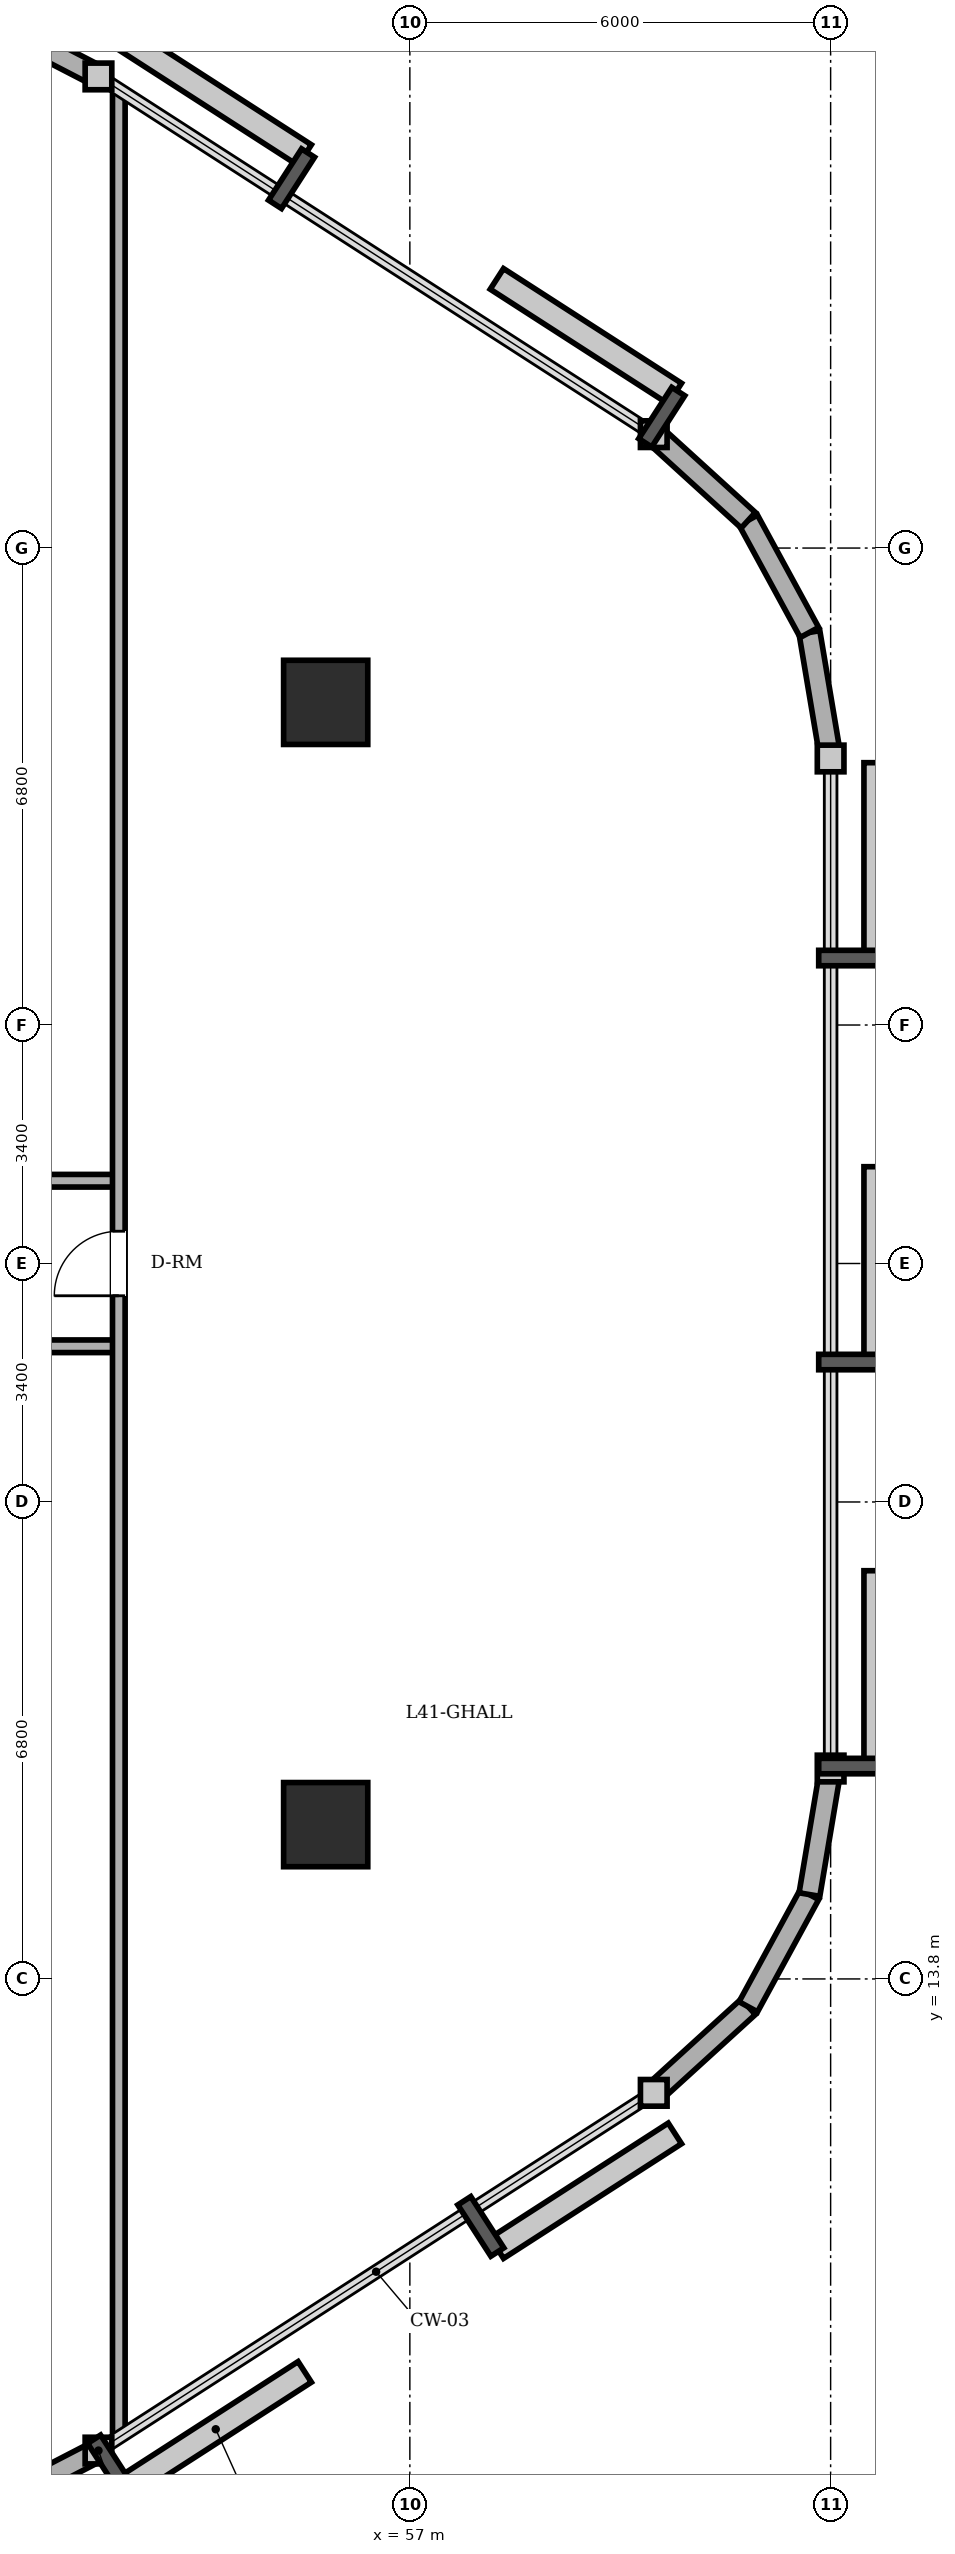
"""IFC4 building model, lengths in metres.
Left out: names, types, materials, properties, quantities, classifications, styles, units other than length and angle.
Written with IfcOpenShell. Run it as: python <this file> out.ifc"""

import sys

from ifc_helpers import new_model, si_unit, direction, frame, frame_2d, origin, origin_2d, place, context, subcontext, project, spatial, rectangle, circle, extrude, element, fill, save


model = new_model("IFC4")
c1 = context("Model", 3, precision=1e-05, world=origin(), true_north=direction((0.0, 1.0)))
c2 = subcontext(c1, "Body", "Model", "MODEL_VIEW")
j1 = project(units=[si_unit("LENGTHUNIT", "METRE"), si_unit("PLANEANGLEUNIT", "RADIAN")], contexts=[c1])
p1 = place(None, origin())
s1 = spatial("IfcSite", under=j1, at=p1, CompositionType="ELEMENT")
p2 = place(p1, origin())
s2 = spatial("IfcBuilding", under=s1, at=p2, CompositionType="ELEMENT")
p3 = place(p2, frame((0.0, 0.0, 158.2)))
s3 = spatial("IfcBuildingStorey", under=s2, at=p3, CompositionType="ELEMENT", Elevation=158.2)
for number, where, z_axis, x_axis in (
    (1, (55.8, 16.0, 0.0), (0.0, 0.0, 1.0), (1.0, 0.0, 0.0)),
    (2, (55.8, 32.0, 0.0), (0.0, 0.0, 1.0), (1.0, 0.0, 0.0)),
):
    element("IfcColumn", number, at=place(p3, frame(where, z_axis=z_axis, x_axis=x_axis)), inside=s3, PredefinedType="COLUMN", context=c2, shape_type="SweptSolid", body=[
        extrude(circle(Radius=0.6, at=origin_2d()), origin(), (0.0, 0.0, 1.0), 3.6),
    ])
p4 = place(p3, frame((51.63, 6.595, 0.0), z_axis=(0.0, 0.0, 1.0), x_axis=(0.888283247196, 0.459296062198, 0.0)))
e3 = element("IfcWall", 3, at=p4, inside=s3, PredefinedType="SOLIDWALL", context=c2, shape_type="SweptSolid", body=[
    extrude(rectangle(XDim=1.047, YDim=0.3, at=frame_2d((0.523, 0.0))), origin(), (0.0, 0.0, 1.0), 3.4),
])
p5 = place(p3, frame((60.478, 12.176, 0.0), z_axis=(0.0, 0.0, 1.0), x_axis=(0.73947929393, 0.673179302897, 0.0)))
e4 = element("IfcWall", 4, at=p5, inside=s3, PredefinedType="SOLIDWALL", context=c2, shape_type="SweptSolid", body=[
    extrude(rectangle(XDim=1.823, YDim=0.3, at=frame_2d((0.911, 0.0))), origin(), (0.0, 0.0, 1.0), 3.4),
])
p6 = place(p3, frame((61.826, 13.403, 0.0), z_axis=(0.0, 0.0, 1.0), x_axis=(0.478608030646, 0.878028674362, 0.0)))
e5 = element("IfcWall", 5, at=p6, inside=s3, PredefinedType="SOLIDWALL", context=c2, shape_type="SweptSolid", body=[
    extrude(rectangle(XDim=1.822, YDim=0.3, at=frame_2d((0.911, 0.0))), origin(), (0.0, 0.0, 1.0), 3.4),
])
for number, where, z_axis, x_axis in (
    (6, (62.698, 15.003, 0.0), (0.0, 0.0, 1.0), (0.166, 0.986, 0.0)),
    (7, (63.0, 31.2, 0.0), (0.0, 0.0, 1.0), (-0.166, 0.986, 0.0)),
):
    element("IfcWall", number, at=place(p3, frame(where, z_axis=z_axis, x_axis=x_axis)), inside=s3, PredefinedType="SOLIDWALL", context=c2, shape_type="SweptSolid", body=[
        extrude(rectangle(XDim=1.822, YDim=0.3, at=frame_2d((0.911, 0.0))), origin(), (0.0, 0.0, 1.0), 3.4),
    ])
p7 = place(p3, frame((62.698, 32.997, 0.0), z_axis=(0.0, 0.0, 1.0), x_axis=(-0.478608030646, 0.878028674362, 0.0)))
e8 = element("IfcWall", 8, at=p7, inside=s3, PredefinedType="SOLIDWALL", context=c2, shape_type="SweptSolid", body=[
    extrude(rectangle(XDim=1.822, YDim=0.3, at=frame_2d((0.911, 0.0))), origin(), (0.0, 0.0, 1.0), 3.4),
])
p8 = place(p3, frame((61.826, 34.597, 0.0), z_axis=(0.0, 0.0, 1.0), x_axis=(-0.73947929393, 0.673179302897, 0.0)))
e9 = element("IfcWall", 9, at=p8, inside=s3, PredefinedType="SOLIDWALL", context=c2, shape_type="SweptSolid", body=[
    extrude(rectangle(XDim=1.823, YDim=0.3, at=frame_2d((0.911, 0.0))), origin(), (0.0, 0.0, 1.0), 3.4),
])
p9 = place(p3, frame((52.56, 40.924, 0.0), z_axis=(0.0, 0.0, 1.0), x_axis=(-0.888283247196, 0.459296062198, 0.0)))
e10 = element("IfcWall", 10, at=p9, inside=s3, PredefinedType="SOLIDWALL", context=c2, shape_type="SweptSolid", body=[
    extrude(rectangle(XDim=1.047, YDim=0.3, at=frame_2d((0.523, 0.0))), origin(), (0.0, 0.0, 1.0), 3.4),
])
for number, where, z_axis, x_axis in (
    (11, (41.75, 22.82, 0.0), (0.0, 0.0, 1.0), (1.0, 0.0, 0.0)),
    (12, (41.75, 25.18, 0.0), (0.0, 0.0, 1.0), (1.0, 0.0, 0.0)),
):
    element("IfcWall", number, at=place(p3, frame(where, z_axis=z_axis, x_axis=x_axis)), inside=s3, PredefinedType="PARTITIONING", context=c2, shape_type="SweptSolid", body=[
        extrude(rectangle(XDim=11.1, YDim=0.18, at=frame_2d((5.55, 0.0))), origin(), (0.0, 0.0, 1.0), 3.4),
    ])
p10 = place(p3, frame((52.85, 7.263, 0.0), z_axis=(0.0, 0.0, 1.0), x_axis=(0.0, 1.0, 0.0)))
e13 = element("IfcWall", 13, at=p10, inside=s3, PredefinedType="PARTITIONING", context=c2, shape_type="SweptSolid", body=[
    extrude(rectangle(XDim=33.474, YDim=0.18, at=frame_2d((16.737, 0.0))), origin(), (0.0, 0.0, 1.0), 3.4),
])
p11 = place(p10, frame((16.277, 0.0, 0.0)))
e14 = element("IfcOpeningElement", 14, at=p11, cuts=e13, PredefinedType="OPENING", context=c2, shape_type="SweptSolid", body=[
    extrude(rectangle(XDim=0.92, YDim=2.1, at=frame_2d((0.46, 1.05))), frame((0.0, 0.1, 0.0), z_axis=(0.0, -1.0, 0.0), x_axis=(1.0, 0.0, 0.0)), (0.0, 0.0, 1.0), 0.2),
])
p12 = place(p11, origin())
e15 = element("IfcDoor", 15, at=p12, inside=s3, OperationType="SINGLE_SWING_LEFT", PredefinedType="DOOR", context=c2, shape_type="SweptSolid", body=[
    extrude(rectangle(XDim=0.92, YDim=2.1, at=frame_2d((0.46, 1.05))), frame((0.0, 0.025, 0.0), z_axis=(0.0, -1.0, 0.0), x_axis=(1.0, 0.0, 0.0)), (0.0, 0.0, 1.0), 0.05),
])
fill(e14, e15)
save(model, sys.argv[1])
